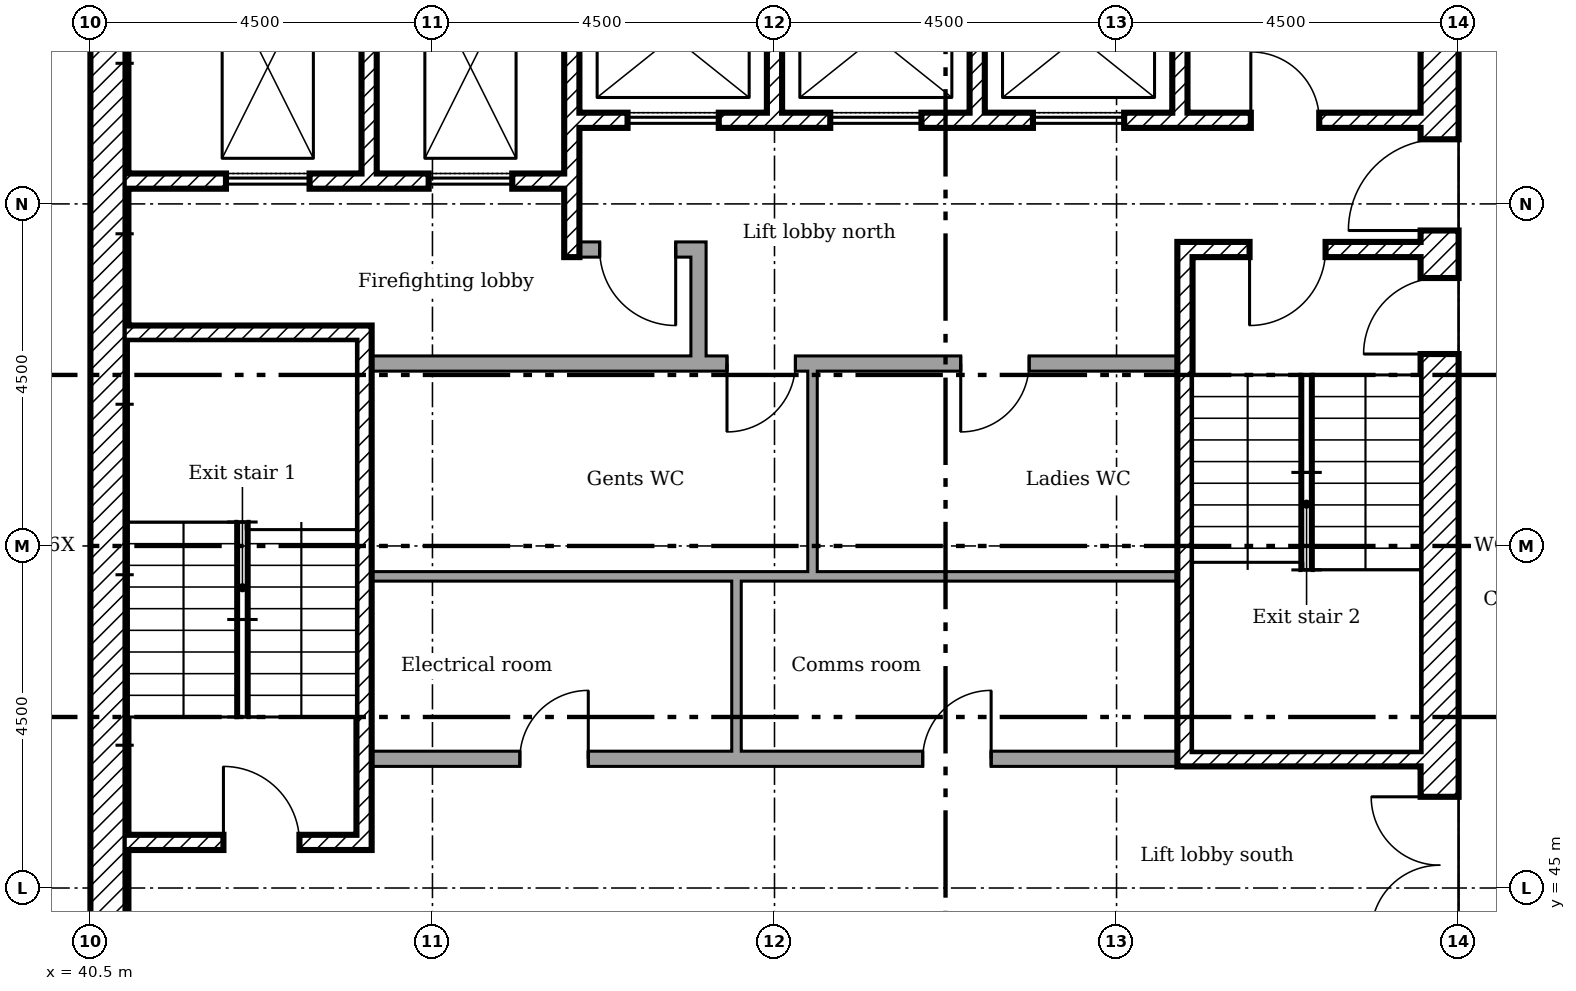
"""IFC4 building model, lengths in metres.
Left out: names, types, materials, properties, quantities, classifications, styles, units other than length and angle.
Written with IfcOpenShell. Run it as: python <this file> out.ifc"""

import sys

from ifc_helpers import new_model, si_unit, direction, frame, frame_2d, origin, place, context, subcontext, project, spatial, rectangle, extrude, element, fill, save


model = new_model("IFC4")
c1 = context("Model", 3, precision=1e-05, world=origin(), true_north=direction((0.0, 1.0)))
c2 = subcontext(c1, "Body", "Model", "MODEL_VIEW")
j1 = project(units=[si_unit("LENGTHUNIT", "METRE"), si_unit("PLANEANGLEUNIT", "RADIAN")], contexts=[c1])
p1 = place(None, origin())
s1 = spatial("IfcSite", under=j1, at=p1, CompositionType="ELEMENT")
p2 = place(p1, origin())
s2 = spatial("IfcBuilding", under=s1, at=p2, CompositionType="ELEMENT")
p3 = place(p2, frame((0.0, 0.0, 224.4)))
s3 = spatial("IfcBuildingStorey", under=s2, at=p3, CompositionType="ELEMENT", Elevation=224.4)
p4 = place(p3, frame((58.25, 40.5, 0.0), z_axis=(0.0, 0.0, 1.0), x_axis=(0.0, 1.0, 0.0)))
e1 = element("IfcWall", 1, at=p4, inside=s3, PredefinedType="SHEAR", context=c2, shape_type="SweptSolid", body=[
    extrude(rectangle(XDim=18.0, YDim=0.5, at=frame_2d((9.0, 0.0))), origin(), (0.0, 0.0, 1.0), 3.35),
])
p5 = place(p4, frame((13.15, 0.0, 0.0)))
e2 = element("IfcOpeningElement", 2, at=p5, cuts=e1, PredefinedType="OPENING", context=c2, shape_type="SweptSolid", body=[
    extrude(rectangle(XDim=1.2, YDim=2.1, at=frame_2d((0.6, 1.05))), frame((0.0, 0.26, 0.0), z_axis=(0.0, -1.0, 0.0), x_axis=(1.0, 0.0, 0.0)), (0.0, 0.0, 1.0), 0.52),
])
p6 = place(p4, frame((3.9, 0.0, 0.0)))
e3 = element("IfcOpeningElement", 3, at=p6, cuts=e1, PredefinedType="OPENING", context=c2, shape_type="SweptSolid", body=[
    extrude(rectangle(XDim=1.8, YDim=2.1, at=frame_2d((0.9, 1.05))), frame((0.0, 0.26, 0.0), z_axis=(0.0, -1.0, 0.0), x_axis=(1.0, 0.0, 0.0)), (0.0, 0.0, 1.0), 0.52),
])
p7 = place(p4, frame((11.525, 0.0, 0.0)))
e4 = element("IfcOpeningElement", 4, at=p7, cuts=e1, PredefinedType="OPENING", context=c2, shape_type="SweptSolid", body=[
    extrude(rectangle(XDim=1.0, YDim=2.1, at=frame_2d((0.5, 1.05))), frame((0.0, 0.26, 0.0), z_axis=(0.0, -1.0, 0.0), x_axis=(1.0, 0.0, 0.0)), (0.0, 0.0, 1.0), 0.52),
])
p8 = place(p3, frame((40.75, 41.0, 0.0), z_axis=(0.0, 0.0, 1.0), x_axis=(0.0, 1.0, 0.0)))
e5 = element("IfcWall", 5, at=p8, inside=s3, PredefinedType="SHEAR", context=c2, shape_type="SweptSolid", body=[
    extrude(rectangle(XDim=17.0, YDim=0.5, at=frame_2d((8.5, 0.0))), origin(), (0.0, 0.0, 1.0), 3.35),
])
p9 = place(p3, frame((44.167, 58.0, 0.0), z_axis=(0.0, 0.0, 1.0), x_axis=(0.0, -1.0, 0.0)))
e6 = element("IfcWall", 6, at=p9, inside=s3, PredefinedType="SHEAR", context=c2, shape_type="SweptSolid", body=[
    extrude(rectangle(XDim=3.6, YDim=0.2, at=frame_2d((1.8, 0.0))), origin(), (0.0, 0.0, 1.0), 3.35),
])
p10 = place(p3, frame((46.833, 58.0, 0.0), z_axis=(0.0, 0.0, 1.0), x_axis=(0.0, -1.0, 0.0)))
e7 = element("IfcWall", 7, at=p10, inside=s3, PredefinedType="SHEAR", context=c2, shape_type="SweptSolid", body=[
    extrude(rectangle(XDim=4.7, YDim=0.2, at=frame_2d((2.35, 0.0))), origin(), (0.0, 0.0, 1.0), 3.35),
])
for number, where, z_axis, x_axis in (
    (8, (49.5, 58.0, 0.0), (0.0, 0.0, 1.0), (0.0, -1.0, 0.0)),
    (9, (52.167, 58.0, 0.0), (0.0, 0.0, 1.0), (0.0, -1.0, 0.0)),
    (10, (54.833, 58.0, 0.0), (0.0, 0.0, 1.0), (0.0, -1.0, 0.0)),
):
    element("IfcWall", number, at=place(p3, frame(where, z_axis=z_axis, x_axis=x_axis)), inside=s3, PredefinedType="SHEAR", context=c2, shape_type="SweptSolid", body=[
        extrude(rectangle(XDim=2.8, YDim=0.2, at=frame_2d((1.4, 0.0))), origin(), (0.0, 0.0, 1.0), 3.35),
    ])
p11 = place(p3, frame((48.5, 51.9, 0.0), z_axis=(0.0, 0.0, 1.0), x_axis=(0.0, 1.0, 0.0)))
e11 = element("IfcWall", 11, at=p11, inside=s3, PredefinedType="PARTITIONING", context=c2, shape_type="SweptSolid", body=[
    extrude(rectangle(XDim=1.6, YDim=0.2, at=frame_2d((0.8, 0.0))), origin(), (0.0, 0.0, 1.0), 3.35),
])
p12 = place(p3, frame((46.933, 53.4, 0.0)))
e12 = element("IfcWall", 12, at=p12, inside=s3, PredefinedType="PARTITIONING", context=c2, shape_type="SweptSolid", body=[
    extrude(rectangle(XDim=1.467, YDim=0.2, at=frame_2d((0.733, 0.0))), origin(), (0.0, 0.0, 1.0), 3.35),
])
p13 = place(p12, frame((0.267, 0.0, 0.0)))
e13 = element("IfcOpeningElement", 13, at=p13, cuts=e12, PredefinedType="OPENING", context=c2, shape_type="SweptSolid", body=[
    extrude(rectangle(XDim=1.0, YDim=2.1, at=frame_2d((0.5, 1.05))), frame((0.0, 0.11, 0.0), z_axis=(0.0, -1.0, 0.0), x_axis=(1.0, 0.0, 0.0)), (0.0, 0.0, 1.0), 0.22),
])
p14 = place(p3, frame((46.933, 55.1, 0.0)))
e14 = element("IfcWall", 14, at=p14, inside=s3, PredefinedType="SHEAR", context=c2, shape_type="SweptSolid", body=[
    extrude(rectangle(XDim=11.067, YDim=0.2, at=frame_2d((5.533, 0.0))), origin(), (0.0, 0.0, 1.0), 3.35),
])
p15 = place(p14, frame((8.833, 0.0, 0.0)))
e15 = element("IfcOpeningElement", 15, at=p15, cuts=e14, PredefinedType="OPENING", context=c2, shape_type="SweptSolid", body=[
    extrude(rectangle(XDim=0.9, YDim=2.1, at=frame_2d((0.45, 1.05))), frame((0.0, 0.11, 0.0), z_axis=(0.0, -1.0, 0.0), x_axis=(1.0, 0.0, 0.0)), (0.0, 0.0, 1.0), 0.22),
])
p16 = place(p14, frame((0.633, 0.0, 0.0)))
e16 = element("IfcOpeningElement", 16, at=p16, cuts=e14, PredefinedType="OPENING", context=c2, shape_type="SweptSolid", body=[
    extrude(rectangle(XDim=1.2, YDim=2.1, at=frame_2d((0.6, 1.05))), frame((0.0, 0.11, 0.0), z_axis=(0.0, -1.0, 0.0), x_axis=(1.0, 0.0, 0.0)), (0.0, 0.0, 1.0), 0.22),
])
p17 = place(p14, frame((3.3, 0.0, 0.0)))
e17 = element("IfcOpeningElement", 17, at=p17, cuts=e14, PredefinedType="OPENING", context=c2, shape_type="SweptSolid", body=[
    extrude(rectangle(XDim=1.2, YDim=2.1, at=frame_2d((0.6, 1.05))), frame((0.0, 0.11, 0.0), z_axis=(0.0, -1.0, 0.0), x_axis=(1.0, 0.0, 0.0)), (0.0, 0.0, 1.0), 0.22),
])
p18 = place(p14, frame((5.967, 0.0, 0.0)))
e18 = element("IfcOpeningElement", 18, at=p18, cuts=e14, PredefinedType="OPENING", context=c2, shape_type="SweptSolid", body=[
    extrude(rectangle(XDim=1.2, YDim=2.1, at=frame_2d((0.6, 1.05))), frame((0.0, 0.11, 0.0), z_axis=(0.0, -1.0, 0.0), x_axis=(1.0, 0.0, 0.0)), (0.0, 0.0, 1.0), 0.22),
])
p19 = place(p3, frame((41.0, 54.3, 0.0)))
e19 = element("IfcWall", 19, at=p19, inside=s3, PredefinedType="SHEAR", context=c2, shape_type="SweptSolid", body=[
    extrude(rectangle(XDim=5.733, YDim=0.2, at=frame_2d((2.867, 0.0))), origin(), (0.0, 0.0, 1.0), 3.35),
])
p20 = place(p19, frame((1.283, 0.0, 0.0)))
e20 = element("IfcOpeningElement", 20, at=p20, cuts=e19, PredefinedType="OPENING", context=c2, shape_type="SweptSolid", body=[
    extrude(rectangle(XDim=1.1, YDim=2.1, at=frame_2d((0.55, 1.05))), frame((0.0, 0.11, 0.0), z_axis=(0.0, -1.0, 0.0), x_axis=(1.0, 0.0, 0.0)), (0.0, 0.0, 1.0), 0.22),
])
p21 = place(p19, frame((3.95, 0.0, 0.0)))
e21 = element("IfcOpeningElement", 21, at=p21, cuts=e19, PredefinedType="OPENING", context=c2, shape_type="SweptSolid", body=[
    extrude(rectangle(XDim=1.1, YDim=2.1, at=frame_2d((0.55, 1.05))), frame((0.0, 0.11, 0.0), z_axis=(0.0, -1.0, 0.0), x_axis=(1.0, 0.0, 0.0)), (0.0, 0.0, 1.0), 0.22),
])
p22 = place(p3, frame((44.1, 45.5, 0.0), z_axis=(0.0, 0.0, 1.0), x_axis=(0.0, 1.0, 0.0)))
e22 = element("IfcWall", 22, at=p22, inside=s3, PredefinedType="SHEAR", context=c2, shape_type="SweptSolid", body=[
    extrude(rectangle(XDim=6.9, YDim=0.2, at=frame_2d((3.45, 0.0))), origin(), (0.0, 0.0, 1.0), 3.35),
])
p23 = place(p3, frame((41.0, 52.3, 0.0)))
e23 = element("IfcWall", 23, at=p23, inside=s3, PredefinedType="SHEAR", context=c2, shape_type="SweptSolid", body=[
    extrude(rectangle(XDim=3.0, YDim=0.2, at=frame_2d((1.5, 0.0))), origin(), (0.0, 0.0, 1.0), 3.35),
])
p24 = place(p3, frame((41.0, 45.6, 0.0)))
e24 = element("IfcWall", 24, at=p24, inside=s3, PredefinedType="SHEAR", context=c2, shape_type="SweptSolid", body=[
    extrude(rectangle(XDim=3.0, YDim=0.2, at=frame_2d((1.5, 0.0))), origin(), (0.0, 0.0, 1.0), 3.35),
])
p25 = place(p24, frame((1.25, 0.0, 0.0)))
e25 = element("IfcOpeningElement", 25, at=p25, cuts=e24, PredefinedType="OPENING", context=c2, shape_type="SweptSolid", body=[
    extrude(rectangle(XDim=1.0, YDim=2.1, at=frame_2d((0.5, 1.05))), frame((0.0, 0.11, 0.0), z_axis=(0.0, -1.0, 0.0), x_axis=(1.0, 0.0, 0.0)), (0.0, 0.0, 1.0), 0.22),
])
p26 = place(p3, frame((54.8, 53.4, 0.0)))
e26 = element("IfcWall", 26, at=p26, inside=s3, PredefinedType="SHEAR", context=c2, shape_type="SweptSolid", body=[
    extrude(rectangle(XDim=3.2, YDim=0.2, at=frame_2d((1.6, 0.0))), origin(), (0.0, 0.0, 1.0), 3.35),
])
p27 = place(p26, frame((0.95, 0.0, 0.0)))
e27 = element("IfcOpeningElement", 27, at=p27, cuts=e26, PredefinedType="OPENING", context=c2, shape_type="SweptSolid", body=[
    extrude(rectangle(XDim=1.0, YDim=2.1, at=frame_2d((0.5, 1.05))), frame((0.0, 0.11, 0.0), z_axis=(0.0, -1.0, 0.0), x_axis=(1.0, 0.0, 0.0)), (0.0, 0.0, 1.0), 0.22),
])
p28 = place(p3, frame((54.8, 46.7, 0.0)))
e28 = element("IfcWall", 28, at=p28, inside=s3, PredefinedType="SHEAR", context=c2, shape_type="SweptSolid", body=[
    extrude(rectangle(XDim=3.2, YDim=0.2, at=frame_2d((1.6, 0.0))), origin(), (0.0, 0.0, 1.0), 3.35),
])
p29 = place(p3, frame((54.9, 46.8, 0.0), z_axis=(0.0, 0.0, 1.0), x_axis=(0.0, 1.0, 0.0)))
e29 = element("IfcWall", 29, at=p29, inside=s3, PredefinedType="SHEAR", context=c2, shape_type="SweptSolid", body=[
    extrude(rectangle(XDim=6.5, YDim=0.2, at=frame_2d((3.25, 0.0))), origin(), (0.0, 0.0, 1.0), 3.35),
])
p30 = place(p3, frame((44.2, 51.9, 0.0)))
e30 = element("IfcWall", 30, at=p30, inside=s3, PredefinedType="PARTITIONING", context=c2, shape_type="SweptSolid", body=[
    extrude(rectangle(XDim=10.6, YDim=0.2, at=frame_2d((5.3, 0.0))), origin(), (0.0, 0.0, 1.0), 3.35),
])
p31 = place(p30, frame((4.675, 0.0, 0.0)))
e31 = element("IfcOpeningElement", 31, at=p31, cuts=e30, PredefinedType="OPENING", context=c2, shape_type="SweptSolid", body=[
    extrude(rectangle(XDim=0.9, YDim=2.1, at=frame_2d((0.45, 1.05))), frame((0.0, 0.11, 0.0), z_axis=(0.0, -1.0, 0.0), x_axis=(1.0, 0.0, 0.0)), (0.0, 0.0, 1.0), 0.22),
])
p32 = place(p30, frame((7.75, 0.0, 0.0)))
e32 = element("IfcOpeningElement", 32, at=p32, cuts=e30, PredefinedType="OPENING", context=c2, shape_type="SweptSolid", body=[
    extrude(rectangle(XDim=0.9, YDim=2.1, at=frame_2d((0.45, 1.05))), frame((0.0, 0.11, 0.0), z_axis=(0.0, -1.0, 0.0), x_axis=(1.0, 0.0, 0.0)), (0.0, 0.0, 1.0), 0.22),
])
p33 = place(p3, frame((44.2, 46.7, 0.0)))
e33 = element("IfcWall", 33, at=p33, inside=s3, PredefinedType="PARTITIONING", context=c2, shape_type="SweptSolid", body=[
    extrude(rectangle(XDim=10.6, YDim=0.2, at=frame_2d((5.3, 0.0))), origin(), (0.0, 0.0, 1.0), 3.35),
])
p34 = place(p33, frame((1.95, 0.0, 0.0)))
e34 = element("IfcOpeningElement", 34, at=p34, cuts=e33, PredefinedType="OPENING", context=c2, shape_type="SweptSolid", body=[
    extrude(rectangle(XDim=0.9, YDim=2.1, at=frame_2d((0.45, 1.05))), frame((0.0, 0.11, 0.0), z_axis=(0.0, -1.0, 0.0), x_axis=(1.0, 0.0, 0.0)), (0.0, 0.0, 1.0), 0.22),
])
p35 = place(p33, frame((7.25, 0.0, 0.0)))
e35 = element("IfcOpeningElement", 35, at=p35, cuts=e33, PredefinedType="OPENING", context=c2, shape_type="SweptSolid", body=[
    extrude(rectangle(XDim=0.9, YDim=2.1, at=frame_2d((0.45, 1.05))), frame((0.0, 0.11, 0.0), z_axis=(0.0, -1.0, 0.0), x_axis=(1.0, 0.0, 0.0)), (0.0, 0.0, 1.0), 0.22),
])
p36 = place(p3, frame((49.0, 46.8, 0.0), z_axis=(0.0, 0.0, 1.0), x_axis=(0.0, 1.0, 0.0)))
e36 = element("IfcWall", 36, at=p36, inside=s3, PredefinedType="PARTITIONING", context=c2, shape_type="SweptSolid", body=[
    extrude(rectangle(XDim=2.363, YDim=0.125, at=frame_2d((1.181, 0.0))), origin(), (0.0, 0.0, 1.0), 3.35),
])
p37 = place(p3, frame((49.0, 49.1, 0.0), z_axis=(0.0, 0.0, 1.0), x_axis=(-1.0, 0.0, 0.0)))
e37 = element("IfcWall", 37, at=p37, inside=s3, PredefinedType="PARTITIONING", context=c2, shape_type="SweptSolid", body=[
    extrude(rectangle(XDim=4.8, YDim=0.125, at=frame_2d((2.4, 0.0))), origin(), (0.0, 0.0, 1.0), 3.35),
])
p38 = place(p3, frame((50.062, 49.1, 0.0), z_axis=(0.0, 0.0, 1.0), x_axis=(-1.0, 0.0, 0.0)))
e38 = element("IfcWall", 38, at=p38, inside=s3, PredefinedType="PARTITIONING", context=c2, shape_type="SweptSolid", body=[
    extrude(rectangle(XDim=1.0, YDim=0.125, at=frame_2d((0.5, 0.0))), origin(), (0.0, 0.0, 1.0), 3.35),
])
p39 = place(p3, frame((54.8, 49.1, 0.0), z_axis=(0.0, 0.0, 1.0), x_axis=(-1.0, 0.0, 0.0)))
e39 = element("IfcWall", 39, at=p39, inside=s3, PredefinedType="PARTITIONING", context=c2, shape_type="SweptSolid", body=[
    extrude(rectangle(XDim=4.8, YDim=0.125, at=frame_2d((2.4, 0.0))), origin(), (0.0, 0.0, 1.0), 3.35),
])
p40 = place(p3, frame((50.0, 49.163, 0.0), z_axis=(0.0, 0.0, 1.0), x_axis=(0.0, 1.0, 0.0)))
e40 = element("IfcWall", 40, at=p40, inside=s3, PredefinedType="PARTITIONING", context=c2, shape_type="SweptSolid", body=[
    extrude(rectangle(XDim=2.637, YDim=0.125, at=frame_2d((1.319, 0.0))), origin(), (0.0, 0.0, 1.0), 3.35),
])
p41 = place(p5, origin())
e41 = element("IfcDoor", 41, at=p41, inside=s3, OperationType="SINGLE_SWING_RIGHT", PredefinedType="DOOR", context=c2, shape_type="SweptSolid", body=[
    extrude(rectangle(XDim=1.2, YDim=2.1, at=frame_2d((0.6, 1.05))), frame((0.0, 0.025, 0.0), z_axis=(0.0, -1.0, 0.0), x_axis=(1.0, 0.0, 0.0)), (0.0, 0.0, 1.0), 0.05),
])
fill(e2, e41)
p42 = place(p6, origin())
e42 = element("IfcDoor", 42, at=p42, inside=s3, OperationType="DOUBLE_DOOR_SINGLE_SWING", PredefinedType="DOOR", context=c2, shape_type="SweptSolid", body=[
    extrude(rectangle(XDim=1.8, YDim=2.1, at=frame_2d((0.9, 1.05))), frame((0.0, 0.025, 0.0), z_axis=(0.0, -1.0, 0.0), x_axis=(1.0, 0.0, 0.0)), (0.0, 0.0, 1.0), 0.05),
])
fill(e3, e42)
p43 = place(p25, origin())
e43 = element("IfcDoor", 43, at=p43, inside=s3, OperationType="SINGLE_SWING_RIGHT", PredefinedType="DOOR", context=c2, shape_type="SweptSolid", body=[
    extrude(rectangle(XDim=1.0, YDim=2.1, at=frame_2d((0.5, 1.05))), frame((0.0, 0.025, 0.0), z_axis=(0.0, -1.0, 0.0), x_axis=(1.0, 0.0, 0.0)), (0.0, 0.0, 1.0), 0.05),
])
fill(e25, e43)
p44 = place(p27, frame((1.0, 0.0, 0.0), x_axis=(-1.0, 0.0, 0.0)))
e44 = element("IfcDoor", 44, at=p44, inside=s3, OperationType="SINGLE_SWING_LEFT", PredefinedType="DOOR", context=c2, shape_type="SweptSolid", body=[
    extrude(rectangle(XDim=1.0, YDim=2.1, at=frame_2d((0.5, 1.05))), frame((0.0, 0.025, 0.0), z_axis=(0.0, -1.0, 0.0), x_axis=(1.0, 0.0, 0.0)), (0.0, 0.0, 1.0), 0.05),
])
fill(e27, e44)
p45 = place(p7, origin())
e45 = element("IfcDoor", 45, at=p45, inside=s3, OperationType="SINGLE_SWING_RIGHT", PredefinedType="DOOR", context=c2, shape_type="SweptSolid", body=[
    extrude(rectangle(XDim=1.0, YDim=2.1, at=frame_2d((0.5, 1.05))), frame((0.0, 0.025, 0.0), z_axis=(0.0, -1.0, 0.0), x_axis=(1.0, 0.0, 0.0)), (0.0, 0.0, 1.0), 0.05),
])
fill(e4, e45)
p46 = place(p13, frame((1.0, 0.0, 0.0), x_axis=(-1.0, 0.0, 0.0)))
e46 = element("IfcDoor", 46, at=p46, inside=s3, OperationType="SINGLE_SWING_RIGHT", PredefinedType="DOOR", context=c2, shape_type="SweptSolid", body=[
    extrude(rectangle(XDim=1.0, YDim=2.1, at=frame_2d((0.5, 1.05))), frame((0.0, 0.025, 0.0), z_axis=(0.0, -1.0, 0.0), x_axis=(1.0, 0.0, 0.0)), (0.0, 0.0, 1.0), 0.05),
])
fill(e13, e46)
p47 = place(p15, origin())
e47 = element("IfcDoor", 47, at=p47, inside=s3, OperationType="SINGLE_SWING_RIGHT", PredefinedType="DOOR", context=c2, shape_type="SweptSolid", body=[
    extrude(rectangle(XDim=0.9, YDim=2.1, at=frame_2d((0.45, 1.05))), frame((0.0, 0.025, 0.0), z_axis=(0.0, -1.0, 0.0), x_axis=(1.0, 0.0, 0.0)), (0.0, 0.0, 1.0), 0.05),
])
fill(e15, e47)
p48 = place(p34, origin())
e48 = element("IfcDoor", 48, at=p48, inside=s3, OperationType="SINGLE_SWING_LEFT", PredefinedType="DOOR", context=c2, shape_type="SweptSolid", body=[
    extrude(rectangle(XDim=0.9, YDim=2.1, at=frame_2d((0.45, 1.05))), frame((0.0, 0.025, 0.0), z_axis=(0.0, -1.0, 0.0), x_axis=(1.0, 0.0, 0.0)), (0.0, 0.0, 1.0), 0.05),
])
fill(e34, e48)
p49 = place(p35, origin())
e49 = element("IfcDoor", 49, at=p49, inside=s3, OperationType="SINGLE_SWING_LEFT", PredefinedType="DOOR", context=c2, shape_type="SweptSolid", body=[
    extrude(rectangle(XDim=0.9, YDim=2.1, at=frame_2d((0.45, 1.05))), frame((0.0, 0.025, 0.0), z_axis=(0.0, -1.0, 0.0), x_axis=(1.0, 0.0, 0.0)), (0.0, 0.0, 1.0), 0.05),
])
fill(e35, e49)
p50 = place(p31, frame((0.9, 0.0, 0.0), x_axis=(-1.0, 0.0, 0.0)))
e50 = element("IfcDoor", 50, at=p50, inside=s3, OperationType="SINGLE_SWING_LEFT", PredefinedType="DOOR", context=c2, shape_type="SweptSolid", body=[
    extrude(rectangle(XDim=0.9, YDim=2.1, at=frame_2d((0.45, 1.05))), frame((0.0, 0.025, 0.0), z_axis=(0.0, -1.0, 0.0), x_axis=(1.0, 0.0, 0.0)), (0.0, 0.0, 1.0), 0.05),
])
fill(e31, e50)
p51 = place(p32, frame((0.9, 0.0, 0.0), x_axis=(-1.0, 0.0, 0.0)))
e51 = element("IfcDoor", 51, at=p51, inside=s3, OperationType="SINGLE_SWING_LEFT", PredefinedType="DOOR", context=c2, shape_type="SweptSolid", body=[
    extrude(rectangle(XDim=0.9, YDim=2.1, at=frame_2d((0.45, 1.05))), frame((0.0, 0.025, 0.0), z_axis=(0.0, -1.0, 0.0), x_axis=(1.0, 0.0, 0.0)), (0.0, 0.0, 1.0), 0.05),
])
fill(e32, e51)
p52 = place(p20, origin())
e52 = element("IfcDoor", 52, at=p52, inside=s3, OperationType="SLIDING_TO_LEFT", PredefinedType="DOOR", context=c2, shape_type="SweptSolid", body=[
    extrude(rectangle(XDim=1.1, YDim=2.1, at=frame_2d((0.55, 1.05))), frame((0.0, 0.025, 0.0), z_axis=(0.0, -1.0, 0.0), x_axis=(1.0, 0.0, 0.0)), (0.0, 0.0, 1.0), 0.05),
])
fill(e20, e52)
p53 = place(p21, origin())
e53 = element("IfcDoor", 53, at=p53, inside=s3, OperationType="SLIDING_TO_LEFT", PredefinedType="DOOR", context=c2, shape_type="SweptSolid", body=[
    extrude(rectangle(XDim=1.1, YDim=2.1, at=frame_2d((0.55, 1.05))), frame((0.0, 0.025, 0.0), z_axis=(0.0, -1.0, 0.0), x_axis=(1.0, 0.0, 0.0)), (0.0, 0.0, 1.0), 0.05),
])
fill(e21, e53)
p54 = place(p16, origin())
e54 = element("IfcDoor", 54, at=p54, inside=s3, OperationType="SLIDING_TO_LEFT", PredefinedType="DOOR", context=c2, shape_type="SweptSolid", body=[
    extrude(rectangle(XDim=1.2, YDim=2.1, at=frame_2d((0.6, 1.05))), frame((0.0, 0.025, 0.0), z_axis=(0.0, -1.0, 0.0), x_axis=(1.0, 0.0, 0.0)), (0.0, 0.0, 1.0), 0.05),
])
fill(e16, e54)
p55 = place(p17, origin())
e55 = element("IfcDoor", 55, at=p55, inside=s3, OperationType="SLIDING_TO_LEFT", PredefinedType="DOOR", context=c2, shape_type="SweptSolid", body=[
    extrude(rectangle(XDim=1.2, YDim=2.1, at=frame_2d((0.6, 1.05))), frame((0.0, 0.025, 0.0), z_axis=(0.0, -1.0, 0.0), x_axis=(1.0, 0.0, 0.0)), (0.0, 0.0, 1.0), 0.05),
])
fill(e17, e55)
p56 = place(p18, origin())
e56 = element("IfcDoor", 56, at=p56, inside=s3, OperationType="SLIDING_TO_LEFT", PredefinedType="DOOR", context=c2, shape_type="SweptSolid", body=[
    extrude(rectangle(XDim=1.2, YDim=2.1, at=frame_2d((0.6, 1.05))), frame((0.0, 0.025, 0.0), z_axis=(0.0, -1.0, 0.0), x_axis=(1.0, 0.0, 0.0)), (0.0, 0.0, 1.0), 0.05),
])
fill(e18, e56)
save(model, sys.argv[1])
